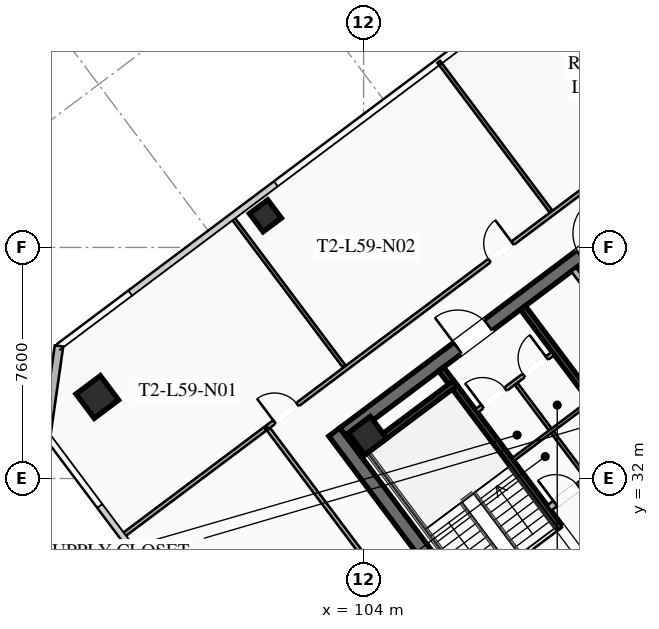
"""IFC4 building model, lengths in metres.
Left out: names, types, materials, properties, quantities, classifications, styles, units other than length and angle.
Written with IfcOpenShell. Run it as: python <this file> out.ifc"""

import sys

from ifc_helpers import new_model, si_unit, direction, frame, frame_2d, origin, origin_2d, place, context, subcontext, project, spatial, rectangle, hollow_rectangle, extrude, element, fill, save


model = new_model("IFC4")
c1 = context("Model", 3, precision=1e-05, world=origin(), true_north=direction((0.0, 1.0)))
c2 = subcontext(c1, "Body", "Model", "MODEL_VIEW")
j1 = project(units=[si_unit("LENGTHUNIT", "METRE"), si_unit("PLANEANGLEUNIT", "RADIAN")], contexts=[c1])
p1 = place(None, origin())
s1 = spatial("IfcSite", under=j1, at=p1, CompositionType="ELEMENT")
p2 = place(p1, origin())
s2 = spatial("IfcBuilding", under=s1, at=p2, CompositionType="ELEMENT")
p3 = place(p2, frame((0.0, 0.0, 218.4)))
s3 = spatial("IfcBuildingStorey", under=s2, at=p3, CompositionType="ELEMENT", Elevation=218.4)
p4 = place(p3, frame((112.396, 21.047, 0.0), z_axis=(0.0, 0.0, 1.0), x_axis=(-0.600005007985, 0.799996243986, 0.0)))
e1 = element("IfcWall", 1, at=p4, inside=s3, PredefinedType="SHEAR", context=c2, shape_type="SweptSolid", body=[
    extrude(rectangle(XDim=15.6, YDim=0.45, at=frame_2d((7.8, 0.0))), origin(), (0.0, 0.0, 1.0), 3.55),
])
p5 = place(p3, frame((103.351, 33.482, 0.0), z_axis=(0.0, 0.0, 1.0), x_axis=(0.8, 0.6, 0.0)))
e2 = element("IfcWall", 2, at=p5, inside=s3, PredefinedType="SHEAR", context=c2, shape_type="SweptSolid", body=[
    extrude(rectangle(XDim=15.26, YDim=0.45, at=frame_2d((7.63, 0.0))), origin(), (0.0, 0.0, 1.0), 3.55),
])
p6 = place(p5, frame((4.68, 0.0, 0.0)))
e3 = element("IfcOpeningElement", 3, at=p6, cuts=e2, PredefinedType="OPENING", context=c2, shape_type="SweptSolid", body=[
    extrude(rectangle(XDim=1.25, YDim=2.25, at=frame_2d((0.625, 1.125))), frame((0.0, 0.235, 0.0), z_axis=(0.0, -1.0, 0.0), x_axis=(1.0, 0.0, 0.0)), (0.0, 0.0, 1.0), 0.47),
])
p7 = place(p5, frame((9.73, 0.0, 0.0)))
e4 = element("IfcOpeningElement", 4, at=p7, cuts=e2, PredefinedType="OPENING", context=c2, shape_type="SweptSolid", body=[
    extrude(rectangle(XDim=1.25, YDim=2.25, at=frame_2d((0.625, 1.125))), frame((0.0, 0.235, 0.0), z_axis=(0.0, -1.0, 0.0), x_axis=(1.0, 0.0, 0.0)), (0.0, 0.0, 1.0), 0.47),
])
p8 = place(p3, frame((104.13, 33.41, 0.0), z_axis=(0.0, 0.0, 1.0), x_axis=(0.799999996291, 0.600000004945, 0.0)))
e5 = element("IfcColumn", 5, at=p8, inside=s3, PredefinedType="COLUMN", context=c2, shape_type="SweptSolid", body=[
    extrude(hollow_rectangle(XDim=0.9, YDim=0.9, WallThickness=0.04, at=origin_2d()), origin(), (0.0, 0.0, 1.0), 3.37),
])
p9 = place(p3, frame((95.24, 34.68, 0.0), z_axis=(0.0, 0.0, 1.0), x_axis=(0.799999996291, 0.600000004945, 0.0)))
e6 = element("IfcColumn", 6, at=p9, inside=s3, PredefinedType="COLUMN", context=c2, shape_type="SweptSolid", body=[
    extrude(hollow_rectangle(XDim=1.0, YDim=1.0, WallThickness=0.04, at=origin_2d()), origin(), (0.0, 0.0, 1.0), 3.37),
])
p10 = place(p3, frame((100.77, 40.64, 0.0), z_axis=(0.0, 0.0, 1.0), x_axis=(0.799999996291, 0.600000004945, 0.0)))
e7 = element("IfcColumn", 7, at=p10, inside=s3, PredefinedType="COLUMN", context=c2, shape_type="SweptSolid", body=[
    extrude(hollow_rectangle(XDim=0.75, YDim=0.75, WallThickness=0.032, at=origin_2d()), origin(), (0.0, 0.0, 1.0), 3.37),
])
p11 = place(p3, frame((93.56, 33.42, 0.0), z_axis=(0.0, 0.0, 1.0), x_axis=(0.14138683146, 0.989954425158, 0.0)))
e8 = element("IfcWall", 8, at=p11, inside=s3, PredefinedType="SOLIDWALL", context=c2, shape_type="SweptSolid", body=[
    extrude(rectangle(XDim=2.97, YDim=0.28, at=frame_2d((1.485, 0.0))), origin(), (0.0, 0.0, 1.0), 3.37),
])
p12 = place(p3, frame((111.44, 29.08, 0.0), z_axis=(0.0, 0.0, 1.0), x_axis=(-0.59999041401, 0.800007189403, 0.0)))
e9 = element("IfcWall", 9, at=p12, inside=s3, PredefinedType="SHEAR", context=c2, shape_type="SweptSolid", body=[
    extrude(rectangle(XDim=8.15, YDim=0.2, at=frame_2d((4.075, 0.0))), origin(), (0.0, 0.0, 1.0), 3.37),
])
p13 = place(p12, frame((0.45, 0.0, 0.0)))
e10 = element("IfcOpeningElement", 10, at=p13, cuts=e9, PredefinedType="OPENING", context=c2, shape_type="SweptSolid", body=[
    extrude(rectangle(XDim=1.15, YDim=2.2, at=frame_2d((0.575, 1.1))), frame((0.0, 0.11, 0.0), z_axis=(0.0, -1.0, 0.0), x_axis=(1.0, 0.0, 0.0)), (0.0, 0.0, 1.0), 0.22),
])
p14 = place(p3, frame((103.876, 32.782, 0.0), z_axis=(0.0, 0.0, 1.0), x_axis=(0.800014909178, 0.599980120581, 0.0)))
e11 = element("IfcWall", 11, at=p14, inside=s3, PredefinedType="SHEAR", context=c2, shape_type="SweptSolid", body=[
    extrude(rectangle(XDim=3.93, YDim=0.2, at=frame_2d((1.965, 0.0))), origin(), (0.0, 0.0, 1.0), 3.37),
])
p15 = place(p3, frame((118.058, 25.856, 0.0), z_axis=(0.0, 0.0, 1.0), x_axis=(-0.600002657301, 0.799998007018, 0.0)))
e12 = element("IfcWall", 12, at=p15, inside=s3, PredefinedType="SHEAR", context=c2, shape_type="SweptSolid", body=[
    extrude(rectangle(XDim=14.7, YDim=0.2, at=frame_2d((7.35, 0.0))), origin(), (0.0, 0.0, 1.0), 3.37),
])
p16 = place(p3, frame((110.104, 31.028, 0.0), z_axis=(0.0, 0.0, 1.0), x_axis=(0.800018601094, 0.59997519774, 0.0)))
e13 = element("IfcWall", 13, at=p16, inside=s3, PredefinedType="SOLIDWALL", context=c2, shape_type="SweptSolid", body=[
    extrude(rectangle(XDim=3.15, YDim=0.22, at=frame_2d((1.575, 0.0))), origin(), (0.0, 0.0, 1.0), 2.723),
])
p17 = place(p16, frame((0.25, 0.0, 0.0)))
e14 = element("IfcOpeningElement", 14, at=p17, cuts=e13, PredefinedType="OPENING", context=c2, shape_type="SweptSolid", body=[
    extrude(rectangle(XDim=0.95, YDim=2.05, at=frame_2d((0.475, 1.025))), frame((0.0, 0.12, 0.0), z_axis=(0.0, -1.0, 0.0), x_axis=(1.0, 0.0, 0.0)), (0.0, 0.0, 1.0), 0.24),
])
p18 = place(p16, frame((1.95, 0.0, 0.0)))
e15 = element("IfcOpeningElement", 15, at=p18, cuts=e13, PredefinedType="OPENING", context=c2, shape_type="SweptSolid", body=[
    extrude(rectangle(XDim=0.95, YDim=2.05, at=frame_2d((0.475, 1.025))), frame((0.0, 0.12, 0.0), z_axis=(0.0, -1.0, 0.0), x_axis=(1.0, 0.0, 0.0)), (0.0, 0.0, 1.0), 0.24),
])
p19 = place(p3, frame((107.71, 34.22, 0.0), z_axis=(0.0, 0.0, 1.0), x_axis=(0.799981399002, 0.60002480053, 0.0)))
e16 = element("IfcWall", 16, at=p19, inside=s3, PredefinedType="PARTITIONING", context=c2, shape_type="SweptSolid", body=[
    extrude(rectangle(XDim=3.15, YDim=0.135, at=frame_2d((1.575, 0.0))), origin(), (0.0, 0.0, 1.0), 2.723),
])
p20 = place(p19, frame((0.25, 0.0, 0.0)))
e17 = element("IfcOpeningElement", 17, at=p20, cuts=e16, PredefinedType="OPENING", context=c2, shape_type="SweptSolid", body=[
    extrude(rectangle(XDim=0.95, YDim=2.05, at=frame_2d((0.475, 1.025))), frame((0.0, 0.077, 0.0), z_axis=(0.0, -1.0, 0.0), x_axis=(1.0, 0.0, 0.0)), (0.0, 0.0, 1.0), 0.155),
])
p21 = place(p19, frame((1.95, 0.0, 0.0)))
e18 = element("IfcOpeningElement", 18, at=p21, cuts=e16, PredefinedType="OPENING", context=c2, shape_type="SweptSolid", body=[
    extrude(rectangle(XDim=0.95, YDim=2.05, at=frame_2d((0.475, 1.025))), frame((0.0, 0.077, 0.0), z_axis=(0.0, -1.0, 0.0), x_axis=(1.0, 0.0, 0.0)), (0.0, 0.0, 1.0), 0.155),
])
p22 = place(p3, frame((111.296, 32.072, 0.0), z_axis=(0.0, 0.0, 1.0), x_axis=(-0.59995887973, 0.800030838552, 0.0)))
e19 = element("IfcWall", 19, at=p22, inside=s3, PredefinedType="PARTITIONING", context=c2, shape_type="SweptSolid", body=[
    extrude(rectangle(XDim=3.8, YDim=0.11, at=frame_2d((1.9, 0.0))), origin(), (0.0, 0.0, 1.0), 2.723),
])
p23 = place(p3, frame((108.91, 32.62, 0.0), z_axis=(0.0, 0.0, 1.0), x_axis=(0.800018601094, 0.59997519774, 0.0)))
e20 = element("IfcWall", 20, at=p23, inside=s3, PredefinedType="PARTITIONING", context=c2, shape_type="SweptSolid", body=[
    extrude(rectangle(XDim=3.15, YDim=0.11, at=frame_2d((1.575, 0.0))), origin(), (0.0, 0.0, 1.0), 2.723),
])
p24 = place(p3, frame((115.11, 33.27, 0.0), z_axis=(0.0, 0.0, 1.0), x_axis=(-0.600011160345, 0.79999162962, 0.0)))
e21 = element("IfcWall", 21, at=p24, inside=s3, PredefinedType="SOLIDWALL", context=c2, shape_type="SweptSolid", body=[
    extrude(rectangle(XDim=7.0, YDim=0.2, at=frame_2d((3.5, 0.0))), origin(), (0.0, 0.0, 1.0), 2.723),
])
p25 = place(p24, frame((0.85, 0.0, 0.0)))
e22 = element("IfcOpeningElement", 22, at=p25, cuts=e21, PredefinedType="OPENING", context=c2, shape_type="SweptSolid", body=[
    extrude(rectangle(XDim=0.95, YDim=2.05, at=frame_2d((0.475, 1.025))), frame((0.0, 0.11, 0.0), z_axis=(0.0, -1.0, 0.0), x_axis=(1.0, 0.0, 0.0)), (0.0, 0.0, 1.0), 0.22),
])
p26 = place(p24, frame((4.85, 0.0, 0.0)))
e23 = element("IfcOpeningElement", 23, at=p26, cuts=e21, PredefinedType="OPENING", context=c2, shape_type="SweptSolid", body=[
    extrude(rectangle(XDim=0.95, YDim=2.05, at=frame_2d((0.475, 1.025))), frame((0.0, 0.11, 0.0), z_axis=(0.0, -1.0, 0.0), x_axis=(1.0, 0.0, 0.0)), (0.0, 0.0, 1.0), 0.22),
])
p27 = place(p3, frame((100.826, 33.682, 0.0), z_axis=(0.0, 0.0, 1.0), x_axis=(0.79999742786, 0.600003429504, 0.0)))
e24 = element("IfcWall", 24, at=p27, inside=s3, PredefinedType="PARTITIONING", context=c2, shape_type="SweptSolid", body=[
    extrude(rectangle(XDim=22.78, YDim=0.135, at=frame_2d((11.39, 0.0))), origin(), (0.0, 0.0, 1.0), 2.723),
])
p28 = place(p27, frame((0.3, 0.0, 0.0)))
e25 = element("IfcOpeningElement", 25, at=p28, cuts=e24, PredefinedType="OPENING", context=c2, shape_type="SweptSolid", body=[
    extrude(rectangle(XDim=0.95, YDim=2.05, at=frame_2d((0.475, 1.025))), frame((0.0, 0.077, 0.0), z_axis=(0.0, -1.0, 0.0), x_axis=(1.0, 0.0, 0.0)), (0.0, 0.0, 1.0), 0.155),
])
p29 = place(p27, frame((9.143, 0.0, 0.0)))
e26 = element("IfcOpeningElement", 26, at=p29, cuts=e24, PredefinedType="OPENING", context=c2, shape_type="SweptSolid", body=[
    extrude(rectangle(XDim=0.95, YDim=2.05, at=frame_2d((0.475, 1.025))), frame((0.0, 0.077, 0.0), z_axis=(0.0, -1.0, 0.0), x_axis=(1.0, 0.0, 0.0)), (0.0, 0.0, 1.0), 0.155),
])
p30 = place(p27, frame((21.53, 0.0, 0.0)))
e27 = element("IfcOpeningElement", 27, at=p30, cuts=e24, PredefinedType="OPENING", context=c2, shape_type="SweptSolid", body=[
    extrude(rectangle(XDim=0.95, YDim=2.05, at=frame_2d((0.475, 1.025))), frame((0.0, 0.077, 0.0), z_axis=(0.0, -1.0, 0.0), x_axis=(1.0, 0.0, 0.0)), (0.0, 0.0, 1.0), 0.155),
])
p31 = place(p3, frame((103.362, 35.684, 0.0), z_axis=(0.0, 0.0, 1.0), x_axis=(-0.6, 0.8, 0.0)))
e28 = element("IfcWall", 28, at=p31, inside=s3, PredefinedType="PARTITIONING", context=c2, shape_type="SweptSolid", body=[
    extrude(rectangle(XDim=6.15, YDim=0.11, at=frame_2d((3.075, 0.0))), origin(), (0.0, 0.0, 1.0), 2.723),
])
p32 = place(p3, frame((110.162, 40.784, 0.0), z_axis=(0.0, 0.0, 1.0), x_axis=(-0.600006351355, 0.799995236444, 0.0)))
e29 = element("IfcWall", 29, at=p32, inside=s3, PredefinedType="PARTITIONING", context=c2, shape_type="SweptSolid", body=[
    extrude(rectangle(XDim=6.15, YDim=0.11, at=frame_2d((3.075, 0.0))), origin(), (0.0, 0.0, 1.0), 2.723),
])
p33 = place(p3, frame((113.09, 17.33, 0.0), z_axis=(0.0, 0.0, 1.0), x_axis=(-0.60000575578, 0.799995683132, 0.0)))
e30 = element("IfcWall", 30, at=p33, inside=s3, PredefinedType="PARTITIONING", context=c2, shape_type="SweptSolid", body=[
    extrude(rectangle(XDim=20.36, YDim=0.135, at=frame_2d((10.18, 0.0))), origin(), (0.0, 0.0, 1.0), 2.723),
])
p34 = place(p33, frame((0.3, 0.0, 0.0)))
e31 = element("IfcOpeningElement", 31, at=p34, cuts=e30, PredefinedType="OPENING", context=c2, shape_type="SweptSolid", body=[
    extrude(rectangle(XDim=0.95, YDim=2.05, at=frame_2d((0.475, 1.025))), frame((0.0, 0.077, 0.0), z_axis=(0.0, -1.0, 0.0), x_axis=(1.0, 0.0, 0.0)), (0.0, 0.0, 1.0), 0.155),
])
p35 = place(p3, frame((100.762, 33.634, 0.0), z_axis=(0.0, 0.0, 1.0), x_axis=(-0.800004990905, -0.599993345402, 0.0)))
e32 = element("IfcWall", 32, at=p35, inside=s3, PredefinedType="PARTITIONING", context=c2, shape_type="SweptSolid", body=[
    extrude(rectangle(XDim=5.87, YDim=0.135, at=frame_2d((2.935, 0.0))), origin(), (0.0, 0.0, 1.0), 2.723),
])
p36 = place(p6, origin())
e33 = element("IfcDoor", 33, at=p36, inside=s3, OperationType="SINGLE_SWING_LEFT", PredefinedType="DOOR", context=c2, shape_type="SweptSolid", body=[
    extrude(rectangle(XDim=1.25, YDim=2.25, at=frame_2d((0.625, 1.125))), frame((0.0, 0.025, 0.0), z_axis=(0.0, -1.0, 0.0), x_axis=(1.0, 0.0, 0.0)), (0.0, 0.0, 1.0), 0.05),
])
fill(e3, e33)
p37 = place(p13, origin())
e34 = element("IfcDoor", 34, at=p37, inside=s3, OperationType="SINGLE_SWING_RIGHT", PredefinedType="DOOR", context=c2, shape_type="SweptSolid", body=[
    extrude(rectangle(XDim=1.15, YDim=2.2, at=frame_2d((0.575, 1.1))), frame((0.0, 0.025, 0.0), z_axis=(0.0, -1.0, 0.0), x_axis=(1.0, 0.0, 0.0)), (0.0, 0.0, 1.0), 0.05),
])
fill(e10, e34)
p38 = place(p20, origin())
e35 = element("IfcDoor", 35, at=p38, inside=s3, OperationType="SINGLE_SWING_LEFT", PredefinedType="DOOR", context=c2, shape_type="SweptSolid", body=[
    extrude(rectangle(XDim=0.95, YDim=2.05, at=frame_2d((0.475, 1.025))), frame((0.0, 0.025, 0.0), z_axis=(0.0, -1.0, 0.0), x_axis=(1.0, 0.0, 0.0)), (0.0, 0.0, 1.0), 0.05),
])
fill(e17, e35)
p39 = place(p21, origin())
e36 = element("IfcDoor", 36, at=p39, inside=s3, OperationType="SINGLE_SWING_RIGHT", PredefinedType="DOOR", context=c2, shape_type="SweptSolid", body=[
    extrude(rectangle(XDim=0.95, YDim=2.05, at=frame_2d((0.475, 1.025))), frame((0.0, 0.025, 0.0), z_axis=(0.0, -1.0, 0.0), x_axis=(1.0, 0.0, 0.0)), (0.0, 0.0, 1.0), 0.05),
])
fill(e18, e36)
p40 = place(p17, origin())
e37 = element("IfcDoor", 37, at=p40, inside=s3, OperationType="SINGLE_SWING_LEFT", PredefinedType="DOOR", context=c2, shape_type="SweptSolid", body=[
    extrude(rectangle(XDim=0.95, YDim=2.05, at=frame_2d((0.475, 1.025))), frame((0.0, 0.025, 0.0), z_axis=(0.0, -1.0, 0.0), x_axis=(1.0, 0.0, 0.0)), (0.0, 0.0, 1.0), 0.05),
])
fill(e14, e37)
p41 = place(p28, origin())
e38 = element("IfcDoor", 38, at=p41, inside=s3, OperationType="SINGLE_SWING_LEFT", PredefinedType="DOOR", context=c2, shape_type="SweptSolid", body=[
    extrude(rectangle(XDim=0.95, YDim=2.05, at=frame_2d((0.475, 1.025))), frame((0.0, 0.025, 0.0), z_axis=(0.0, -1.0, 0.0), x_axis=(1.0, 0.0, 0.0)), (0.0, 0.0, 1.0), 0.05),
])
fill(e25, e38)
p42 = place(p29, origin())
e39 = element("IfcDoor", 39, at=p42, inside=s3, OperationType="SINGLE_SWING_RIGHT", PredefinedType="DOOR", context=c2, shape_type="SweptSolid", body=[
    extrude(rectangle(XDim=0.95, YDim=2.05, at=frame_2d((0.475, 1.025))), frame((0.0, 0.025, 0.0), z_axis=(0.0, -1.0, 0.0), x_axis=(1.0, 0.0, 0.0)), (0.0, 0.0, 1.0), 0.05),
])
fill(e26, e39)
save(model, sys.argv[1])
